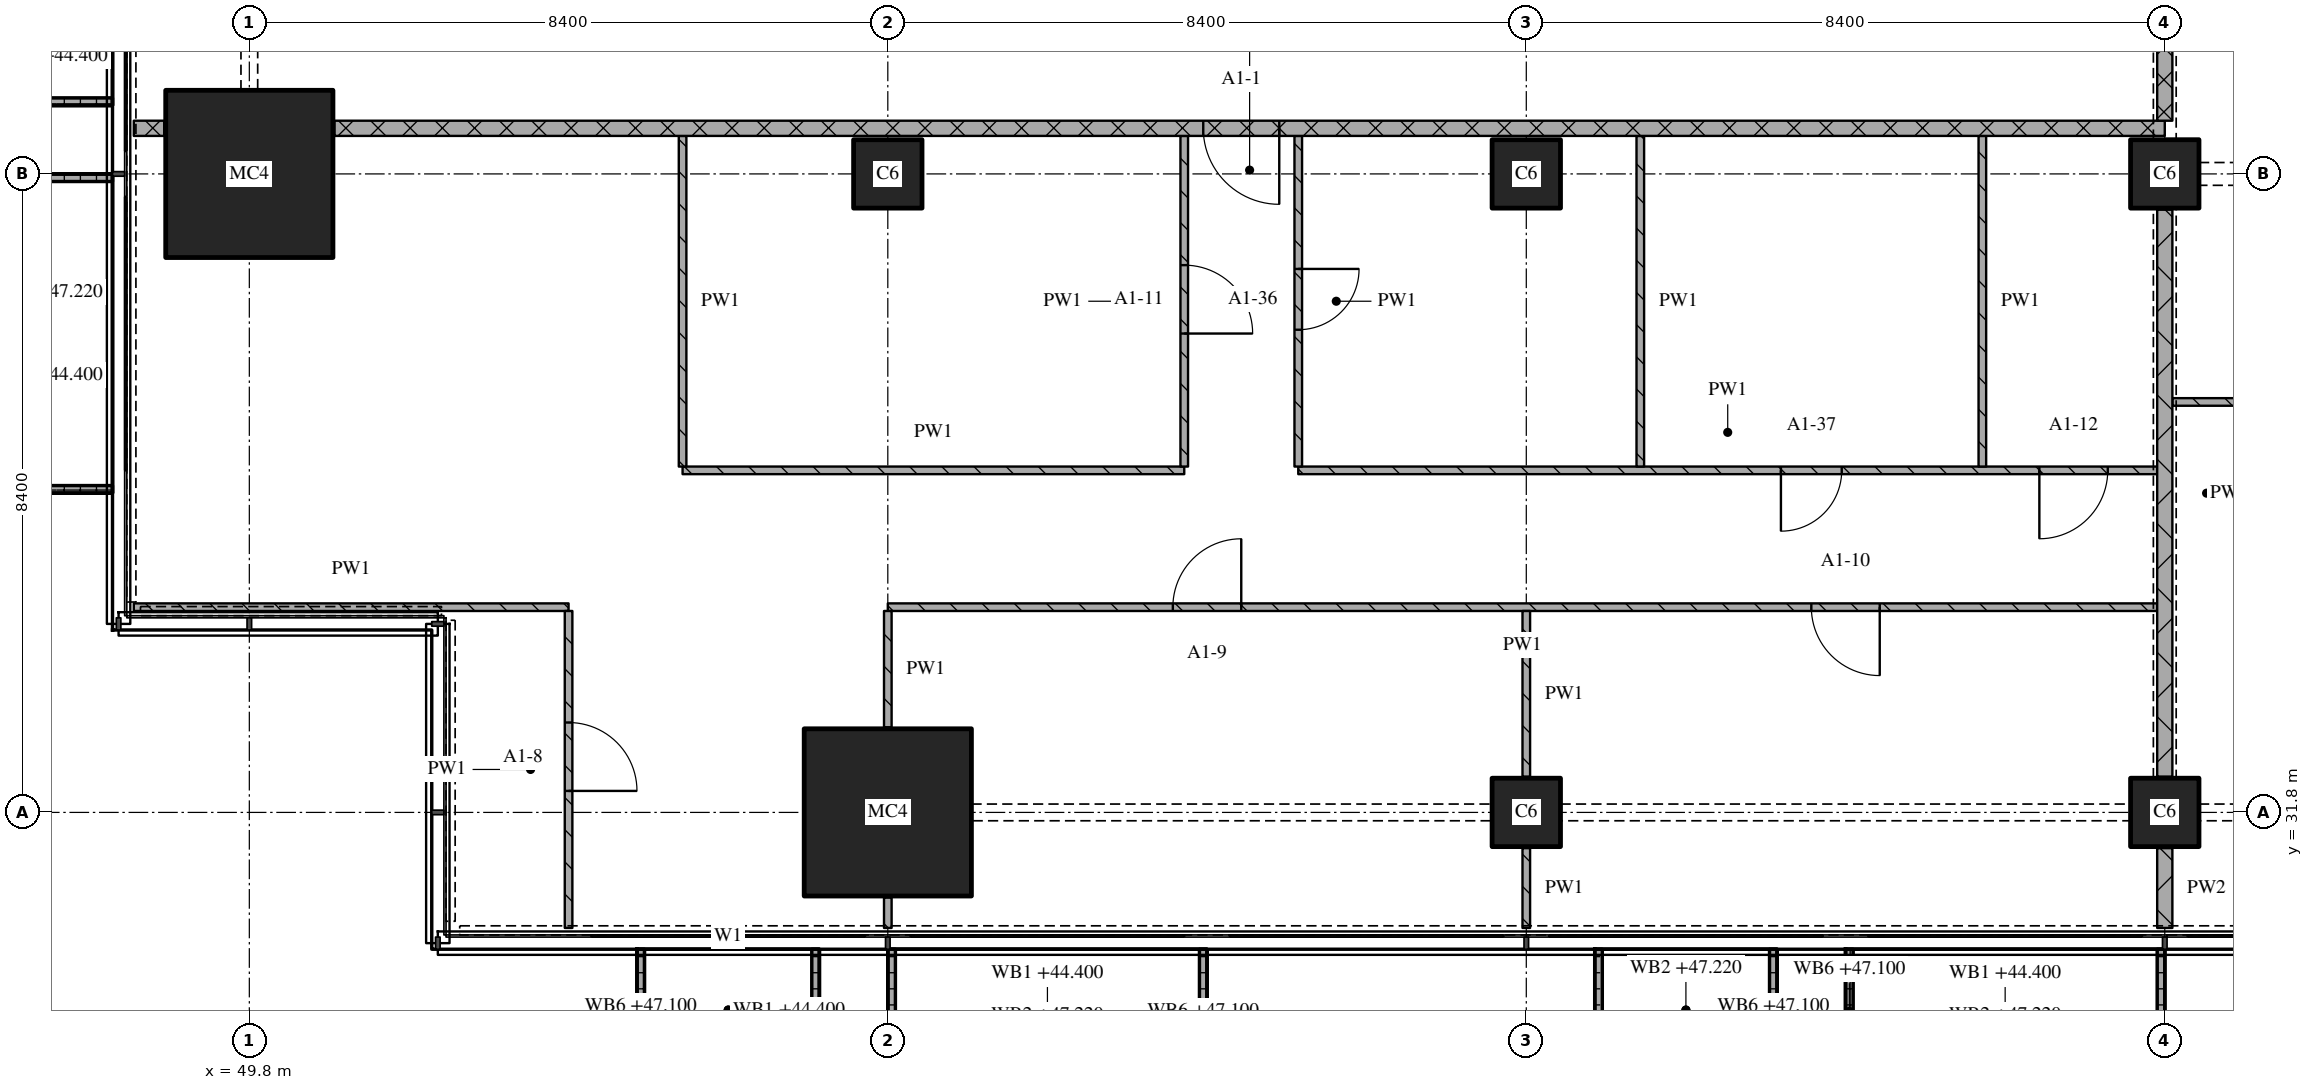
"""IFC4 building model, lengths in metres.
Left out: names, types, materials, properties, quantities, classifications, styles, units other than length and angle.
Written with IfcOpenShell. Run it as: python <this file> out.ifc"""

import sys

from ifc_helpers import new_model, si_unit, direction, frame, frame_2d, origin, origin_2d, place, context, subcontext, project, spatial, polyline, rectangle, outline, extrude, element, fill, save


model = new_model("IFC4")
c1 = context("Model", 3, precision=1e-05, world=origin(), true_north=direction((0.0, 1.0)))
c2 = subcontext(c1, "Body", "Model", "MODEL_VIEW")
j1 = project(units=[si_unit("LENGTHUNIT", "METRE"), si_unit("PLANEANGLEUNIT", "RADIAN")], contexts=[c1])
p1 = place(None, origin())
s1 = spatial("IfcSite", under=j1, at=p1, CompositionType="ELEMENT")
p2 = place(p1, origin())
s2 = spatial("IfcBuilding", under=s1, at=p2, CompositionType="ELEMENT")
p3 = place(p2, frame((0.0, 0.0, 44.4)))
s3 = spatial("IfcBuildingStorey", under=s2, at=p3, CompositionType="ELEMENT", Elevation=44.4)
for number, where, z_axis, x_axis in (
    (1, (49.8, 40.2, 0.0), (0.0, 0.0, 1.0), (1.0, 0.0, 0.0)),
    (2, (58.2, 31.8, 0.0), (0.0, 0.0, 1.0), (1.0, 0.0, 0.0)),
):
    element("IfcColumn", number, at=place(p3, frame(where, z_axis=z_axis, x_axis=x_axis)), inside=s3, PredefinedType="COLUMN", context=c2, shape_type="SweptSolid", body=[
        extrude(rectangle(XDim=2.2, YDim=2.2, at=origin_2d()), origin(), (0.0, 0.0, 1.0), 3.6),
    ])
for number, where, z_axis, x_axis in (
    (3, (58.2, 40.2, 0.0), (0.0, 0.0, 1.0), (1.0, 0.0, 0.0)),
    (4, (66.6, 31.8, 0.0), (0.0, 0.0, 1.0), (1.0, 0.0, 0.0)),
    (5, (66.6, 40.2, 0.0), (0.0, 0.0, 1.0), (1.0, 0.0, 0.0)),
    (6, (75.0, 31.8, 0.0), (0.0, 0.0, 1.0), (1.0, 0.0, 0.0)),
    (7, (75.0, 40.2, 0.0), (0.0, 0.0, 1.0), (1.0, 0.0, 0.0)),
):
    element("IfcColumn", number, at=place(p3, frame(where, z_axis=z_axis, x_axis=x_axis)), inside=s3, PredefinedType="COLUMN", context=c2, shape_type="SweptSolid", body=[
        extrude(rectangle(XDim=0.9, YDim=0.9, at=origin_2d()), origin(), (0.0, 0.0, 1.0), 3.6),
    ])
p4 = place(p3, origin())
e8 = element("IfcWall", 8, at=p4, inside=s3, PredefinedType="SOLIDWALL", context=c2, shape_type="SweptSolid", body=[
    extrude(outline(polyline([(54.9, 30.0), (55.0, 30.0), (55.0, 28.5), (57.2, 28.5), (57.2, 30.0), (57.3, 30.0), (57.3, 28.4), (54.9, 28.4), (54.9, 30.0)])), origin(), (0.0, 0.0, 1.0), 1.0),
])
p5 = place(p3, origin())
e9 = element("IfcWall", 9, at=p5, inside=s3, PredefinedType="SOLIDWALL", context=c2, shape_type="SweptSolid", body=[
    extrude(outline(polyline([(58.2, 30.0), (58.3, 30.0), (58.3, 28.367), (62.3, 28.367), (62.3, 30.0), (62.4, 30.0), (62.4, 28.267), (58.2, 28.267), (58.2, 30.0)])), origin(), (0.0, 0.0, 1.0), 1.0),
])
p6 = place(p3, origin())
e10 = element("IfcWall", 10, at=p6, inside=s3, PredefinedType="SOLIDWALL", context=c2, shape_type="SweptSolid", body=[
    extrude(outline(polyline([(67.5, 30.0), (67.6, 30.0), (67.6, 28.5), (69.8, 28.5), (69.8, 30.0), (69.9, 30.0), (69.9, 28.4), (67.5, 28.4), (67.5, 30.0)])), origin(), (0.0, 0.0, 1.0), 1.0),
])
p7 = place(p3, origin())
e11 = element("IfcWall", 11, at=p7, inside=s3, PredefinedType="SOLIDWALL", context=c2, shape_type="SweptSolid", body=[
    extrude(outline(polyline([(70.8, 30.0), (70.9, 30.0), (70.9, 28.367), (74.9, 28.367), (74.9, 30.0), (75.0, 30.0), (75.0, 28.267), (70.8, 28.267), (70.8, 30.0)])), origin(), (0.0, 0.0, 1.0), 1.0),
])
p8 = place(p3, origin())
e12 = element("IfcWall", 12, at=p8, inside=s3, PredefinedType="SOLIDWALL", context=c2, shape_type="SweptSolid", body=[
    extrude(outline(polyline([(48.0, 43.5), (48.0, 43.4), (46.5, 43.4), (46.5, 41.2), (48.0, 41.2), (48.0, 41.1), (46.4, 41.1), (46.4, 43.5), (48.0, 43.5)])), origin(), (0.0, 0.0, 1.0), 1.0),
])
p9 = place(p3, origin())
e13 = element("IfcWall", 13, at=p9, inside=s3, PredefinedType="SOLIDWALL", context=c2, shape_type="SweptSolid", body=[
    extrude(outline(polyline([(48.0, 40.2), (48.0, 40.1), (46.367, 40.1), (46.367, 36.1), (48.0, 36.1), (48.0, 36.0), (46.267, 36.0), (46.267, 40.2), (48.0, 40.2)])), origin(), (0.0, 0.0, 1.0), 1.0),
])
p10 = place(p3, frame((48.28, 34.5, 0.0), z_axis=(0.0, 0.0, 1.0), x_axis=(1.0, 0.0, 0.0)))
e14 = element("IfcWall", 14, at=p10, inside=s3, PredefinedType="PARTITIONING", context=c2, shape_type="SweptSolid", body=[
    extrude(rectangle(XDim=5.72, YDim=0.1, at=frame_2d((2.86, 0.0))), origin(), (0.0, 0.0, 1.0), 3.32),
])
p11 = place(p3, frame((74.9, 34.5, 0.0), z_axis=(0.0, 0.0, 1.0), x_axis=(-1.0, 0.0, 0.0)))
e15 = element("IfcWall", 15, at=p11, inside=s3, PredefinedType="PARTITIONING", context=c2, shape_type="SweptSolid", body=[
    extrude(rectangle(XDim=16.7, YDim=0.1, at=frame_2d((8.35, 0.0))), origin(), (0.0, 0.0, 1.0), 3.32),
])
p12 = place(p11, frame((3.65, 0.0, 0.0)))
e16 = element("IfcOpeningElement", 16, at=p12, cuts=e15, PredefinedType="OPENING", context=c2, shape_type="SweptSolid", body=[
    extrude(rectangle(XDim=0.9, YDim=2.1, at=frame_2d((0.45, 1.05))), frame((0.0, 0.06, 0.0), z_axis=(0.0, -1.0, 0.0), x_axis=(1.0, 0.0, 0.0)), (0.0, 0.0, 1.0), 0.12),
])
p13 = place(p11, frame((12.05, 0.0, 0.0)))
e17 = element("IfcOpeningElement", 17, at=p13, cuts=e15, PredefinedType="OPENING", context=c2, shape_type="SweptSolid", body=[
    extrude(rectangle(XDim=0.9, YDim=2.1, at=frame_2d((0.45, 1.05))), frame((0.0, 0.06, 0.0), z_axis=(0.0, -1.0, 0.0), x_axis=(1.0, 0.0, 0.0)), (0.0, 0.0, 1.0), 0.12),
])
p14 = place(p3, frame((55.5, 36.3, 0.0), z_axis=(0.0, 0.0, 1.0), x_axis=(1.0, 0.0, 0.0)))
e18 = element("IfcWall", 18, at=p14, inside=s3, PredefinedType="PARTITIONING", context=c2, shape_type="SweptSolid", body=[
    extrude(rectangle(XDim=6.6, YDim=0.1, at=frame_2d((3.3, 0.0))), origin(), (0.0, 0.0, 1.0), 3.32),
])
p15 = place(p3, frame((63.6, 36.3, 0.0), z_axis=(0.0, 0.0, 1.0), x_axis=(1.0, 0.0, 0.0)))
e19 = element("IfcWall", 19, at=p15, inside=s3, PredefinedType="PARTITIONING", context=c2, shape_type="SweptSolid", body=[
    extrude(rectangle(XDim=11.3, YDim=0.1, at=frame_2d((5.65, 0.0))), origin(), (0.0, 0.0, 1.0), 3.32),
])
p16 = place(p15, frame((6.35, 0.0, 0.0)))
e20 = element("IfcOpeningElement", 20, at=p16, cuts=e19, PredefinedType="OPENING", context=c2, shape_type="SweptSolid", body=[
    extrude(rectangle(XDim=0.8, YDim=2.1, at=frame_2d((0.4, 1.05))), frame((0.0, 0.06, 0.0), z_axis=(0.0, -1.0, 0.0), x_axis=(1.0, 0.0, 0.0)), (0.0, 0.0, 1.0), 0.12),
])
p17 = place(p15, frame((9.75, 0.0, 0.0)))
e21 = element("IfcOpeningElement", 21, at=p17, cuts=e19, PredefinedType="OPENING", context=c2, shape_type="SweptSolid", body=[
    extrude(rectangle(XDim=0.9, YDim=2.1, at=frame_2d((0.45, 1.05))), frame((0.0, 0.06, 0.0), z_axis=(0.0, -1.0, 0.0), x_axis=(1.0, 0.0, 0.0)), (0.0, 0.0, 1.0), 0.12),
])
p18 = place(p3, frame((87.6, 37.2, 0.0), z_axis=(0.0, 0.0, 1.0), x_axis=(-1.0, 0.0, 0.0)))
e22 = element("IfcWall", 22, at=p18, inside=s3, PredefinedType="PARTITIONING", context=c2, shape_type="SweptSolid", body=[
    extrude(rectangle(XDim=12.5, YDim=0.1, at=frame_2d((6.25, 0.0))), origin(), (0.0, 0.0, 1.0), 3.32),
])
p19 = place(p18, frame((5.85, 0.0, 0.0)))
e23 = element("IfcOpeningElement", 23, at=p19, cuts=e22, PredefinedType="OPENING", context=c2, shape_type="SweptSolid", body=[
    extrude(rectangle(XDim=0.9, YDim=2.1, at=frame_2d((0.45, 1.05))), frame((0.0, 0.06, 0.0), z_axis=(0.0, -1.0, 0.0), x_axis=(1.0, 0.0, 0.0)), (0.0, 0.0, 1.0), 0.12),
])
p20 = place(p18, frame((10.05, 0.0, 0.0)))
e24 = element("IfcOpeningElement", 24, at=p20, cuts=e22, PredefinedType="OPENING", context=c2, shape_type="SweptSolid", body=[
    extrude(rectangle(XDim=0.9, YDim=2.1, at=frame_2d((0.45, 1.05))), frame((0.0, 0.06, 0.0), z_axis=(0.0, -1.0, 0.0), x_axis=(1.0, 0.0, 0.0)), (0.0, 0.0, 1.0), 0.12),
])
p21 = place(p3, frame((48.28, 40.8, 0.0), z_axis=(0.0, 0.0, 1.0), x_axis=(1.0, 0.0, 0.0)))
e25 = element("IfcWall", 25, at=p21, inside=s3, PredefinedType="PARTITIONING", context=c2, shape_type="SweptSolid", body=[
    extrude(rectangle(XDim=0.4, YDim=0.2, at=frame_2d((0.2, 0.0))), origin(), (0.0, 0.0, 1.0), 3.32),
])
p22 = place(p3, frame((75.0, 40.8, 0.0), z_axis=(0.0, 0.0, 1.0), x_axis=(-1.0, 0.0, 0.0)))
e26 = element("IfcWall", 26, at=p22, inside=s3, PredefinedType="PARTITIONING", context=c2, shape_type="SweptSolid", body=[
    extrude(rectangle(XDim=24.08, YDim=0.2, at=frame_2d((12.04, 0.0))), origin(), (0.0, 0.0, 1.0), 3.32),
])
p23 = place(p22, frame((11.65, 0.0, 0.0)))
e27 = element("IfcOpeningElement", 27, at=p23, cuts=e26, PredefinedType="OPENING", context=c2, shape_type="SweptSolid", body=[
    extrude(rectangle(XDim=1.0, YDim=2.1, at=frame_2d((0.5, 1.05))), frame((0.0, 0.11, 0.0), z_axis=(0.0, -1.0, 0.0), x_axis=(1.0, 0.0, 0.0)), (0.0, 0.0, 1.0), 0.22),
])
p24 = place(p3, frame((54.0, 30.28, 0.0), z_axis=(0.0, 0.0, 1.0), x_axis=(0.0, 1.0, 0.0)))
e28 = element("IfcWall", 28, at=p24, inside=s3, PredefinedType="PARTITIONING", context=c2, shape_type="SweptSolid", body=[
    extrude(rectangle(XDim=4.17, YDim=0.1, at=frame_2d((2.085, 0.0))), origin(), (0.0, 0.0, 1.0), 3.32),
])
p25 = place(p24, frame((1.803, 0.0, 0.0)))
e29 = element("IfcOpeningElement", 29, at=p25, cuts=e28, PredefinedType="OPENING", context=c2, shape_type="SweptSolid", body=[
    extrude(rectangle(XDim=0.9, YDim=2.1, at=frame_2d((0.45, 1.05))), frame((0.0, 0.06, 0.0), z_axis=(0.0, -1.0, 0.0), x_axis=(1.0, 0.0, 0.0)), (0.0, 0.0, 1.0), 0.12),
])
p26 = place(p3, frame((55.5, 40.7, 0.0), z_axis=(0.0, 0.0, 1.0), x_axis=(0.0, -1.0, 0.0)))
e30 = element("IfcWall", 30, at=p26, inside=s3, PredefinedType="PARTITIONING", context=c2, shape_type="SweptSolid", body=[
    extrude(rectangle(XDim=4.35, YDim=0.1, at=frame_2d((2.175, 0.0))), origin(), (0.0, 0.0, 1.0), 3.32),
])
p27 = place(p3, frame((58.2, 30.68, 0.0), z_axis=(0.0, 0.0, 1.0), x_axis=(0.0, -1.0, 0.0)))
e31 = element("IfcWall", 31, at=p27, inside=s3, PredefinedType="PARTITIONING", context=c2, shape_type="SweptSolid", body=[
    extrude(rectangle(XDim=0.4, YDim=0.1, at=frame_2d((0.2, 0.0))), origin(), (0.0, 0.0, 1.0), 3.32),
])
p28 = place(p3, frame((58.2, 34.45, 0.0), z_axis=(0.0, 0.0, 1.0), x_axis=(0.0, -1.0, 0.0)))
e32 = element("IfcWall", 32, at=p28, inside=s3, PredefinedType="PARTITIONING", context=c2, shape_type="SweptSolid", body=[
    extrude(rectangle(XDim=1.53, YDim=0.1, at=frame_2d((0.765, 0.0))), origin(), (0.0, 0.0, 1.0), 3.32),
])
p29 = place(p3, frame((62.1, 36.35, 0.0), z_axis=(0.0, 0.0, 1.0), x_axis=(0.0, 1.0, 0.0)))
e33 = element("IfcWall", 33, at=p29, inside=s3, PredefinedType="PARTITIONING", context=c2, shape_type="SweptSolid", body=[
    extrude(rectangle(XDim=4.35, YDim=0.1, at=frame_2d((2.175, 0.0))), origin(), (0.0, 0.0, 1.0), 3.32),
])
p30 = place(p29, frame((1.75, 0.0, 0.0)))
e34 = element("IfcOpeningElement", 34, at=p30, cuts=e33, PredefinedType="OPENING", context=c2, shape_type="SweptSolid", body=[
    extrude(rectangle(XDim=0.9, YDim=2.1, at=frame_2d((0.45, 1.05))), frame((0.0, 0.06, 0.0), z_axis=(0.0, -1.0, 0.0), x_axis=(1.0, 0.0, 0.0)), (0.0, 0.0, 1.0), 0.12),
])
p31 = place(p3, frame((63.6, 40.7, 0.0), z_axis=(0.0, 0.0, 1.0), x_axis=(0.0, -1.0, 0.0)))
e35 = element("IfcWall", 35, at=p31, inside=s3, PredefinedType="PARTITIONING", context=c2, shape_type="SweptSolid", body=[
    extrude(rectangle(XDim=4.35, YDim=0.1, at=frame_2d((2.175, 0.0))), origin(), (0.0, 0.0, 1.0), 3.32),
])
p32 = place(p31, frame((1.75, 0.0, 0.0)))
e36 = element("IfcOpeningElement", 36, at=p32, cuts=e35, PredefinedType="OPENING", context=c2, shape_type="SweptSolid", body=[
    extrude(rectangle(XDim=0.8, YDim=2.1, at=frame_2d((0.4, 1.05))), frame((0.0, 0.06, 0.0), z_axis=(0.0, -1.0, 0.0), x_axis=(1.0, 0.0, 0.0)), (0.0, 0.0, 1.0), 0.12),
])
p33 = place(p3, frame((66.6, 31.33, 0.0), z_axis=(0.0, 0.0, 1.0), x_axis=(0.0, -1.0, 0.0)))
e37 = element("IfcWall", 37, at=p33, inside=s3, PredefinedType="PARTITIONING", context=c2, shape_type="SweptSolid", body=[
    extrude(rectangle(XDim=1.05, YDim=0.1, at=frame_2d((0.525, 0.0))), origin(), (0.0, 0.0, 1.0), 3.32),
])
p34 = place(p3, frame((66.6, 34.45, 0.0), z_axis=(0.0, 0.0, 1.0), x_axis=(0.0, -1.0, 0.0)))
e38 = element("IfcWall", 38, at=p34, inside=s3, PredefinedType="PARTITIONING", context=c2, shape_type="SweptSolid", body=[
    extrude(rectangle(XDim=2.18, YDim=0.1, at=frame_2d((1.09, 0.0))), origin(), (0.0, 0.0, 1.0), 3.32),
])
for number, where, z_axis, x_axis in (
    (39, (68.1, 40.7, 0.0), (0.0, 0.0, 1.0), (0.0, -1.0, 0.0)),
    (40, (72.6, 40.7, 0.0), (0.0, 0.0, 1.0), (0.0, -1.0, 0.0)),
):
    element("IfcWall", number, at=place(p3, frame(where, z_axis=z_axis, x_axis=x_axis)), inside=s3, PredefinedType="PARTITIONING", context=c2, shape_type="SweptSolid", body=[
        extrude(rectangle(XDim=4.35, YDim=0.1, at=frame_2d((2.175, 0.0))), origin(), (0.0, 0.0, 1.0), 3.32),
    ])
p35 = place(p3, frame((75.0, 43.1, 0.0), z_axis=(0.0, 0.0, 1.0), x_axis=(0.0, -1.0, 0.0)))
e41 = element("IfcWall", 41, at=p35, inside=s3, PredefinedType="PARTITIONING", context=c2, shape_type="SweptSolid", body=[
    extrude(rectangle(XDim=2.2, YDim=0.2, at=frame_2d((1.1, 0.0))), origin(), (0.0, 0.0, 1.0), 2.43),
])
p36 = place(p3, frame((75.0, 31.33, 0.0), z_axis=(0.0, 0.0, 1.0), x_axis=(0.0, -1.0, 0.0)))
e42 = element("IfcWall", 42, at=p36, inside=s3, PredefinedType="PARTITIONING", context=c2, shape_type="SweptSolid", body=[
    extrude(rectangle(XDim=1.05, YDim=0.2, at=frame_2d((0.525, 0.0))), origin(), (0.0, 0.0, 1.0), 3.32),
])
p37 = place(p3, frame((75.0, 39.73, 0.0), z_axis=(0.0, 0.0, 1.0), x_axis=(0.0, -1.0, 0.0)))
e43 = element("IfcWall", 43, at=p37, inside=s3, PredefinedType="PARTITIONING", context=c2, shape_type="SweptSolid", body=[
    extrude(rectangle(XDim=7.46, YDim=0.2, at=frame_2d((3.73, 0.0))), origin(), (0.0, 0.0, 1.0), 2.83),
])
p38 = place(p12, origin())
e44 = element("IfcDoor", 44, at=p38, inside=s3, OperationType="SINGLE_SWING_LEFT", PredefinedType="DOOR", context=c2, shape_type="SweptSolid", body=[
    extrude(rectangle(XDim=0.9, YDim=2.1, at=frame_2d((0.45, 1.05))), frame((0.0, 0.025, 0.0), z_axis=(0.0, -1.0, 0.0), x_axis=(1.0, 0.0, 0.0)), (0.0, 0.0, 1.0), 0.05),
])
fill(e16, e44)
p39 = place(p13, origin())
e45 = element("IfcDoor", 45, at=p39, inside=s3, OperationType="SINGLE_SWING_RIGHT", PredefinedType="DOOR", context=c2, shape_type="SweptSolid", body=[
    extrude(rectangle(XDim=0.9, YDim=2.1, at=frame_2d((0.45, 1.05))), frame((0.0, 0.025, 0.0), z_axis=(0.0, -1.0, 0.0), x_axis=(1.0, 0.0, 0.0)), (0.0, 0.0, 1.0), 0.05),
])
fill(e17, e45)
p40 = place(p16, origin())
e46 = element("IfcDoor", 46, at=p40, inside=s3, OperationType="SINGLE_SWING_RIGHT", PredefinedType="DOOR", context=c2, shape_type="SweptSolid", body=[
    extrude(rectangle(XDim=0.8, YDim=2.1, at=frame_2d((0.4, 1.05))), frame((0.0, 0.025, 0.0), z_axis=(0.0, -1.0, 0.0), x_axis=(1.0, 0.0, 0.0)), (0.0, 0.0, 1.0), 0.05),
])
fill(e20, e46)
p41 = place(p17, origin())
e47 = element("IfcDoor", 47, at=p41, inside=s3, OperationType="SINGLE_SWING_RIGHT", PredefinedType="DOOR", context=c2, shape_type="SweptSolid", body=[
    extrude(rectangle(XDim=0.9, YDim=2.1, at=frame_2d((0.45, 1.05))), frame((0.0, 0.025, 0.0), z_axis=(0.0, -1.0, 0.0), x_axis=(1.0, 0.0, 0.0)), (0.0, 0.0, 1.0), 0.05),
])
fill(e21, e47)
p42 = place(p23, origin())
e48 = element("IfcDoor", 48, at=p42, inside=s3, OperationType="SINGLE_SWING_LEFT", PredefinedType="DOOR", context=c2, shape_type="SweptSolid", body=[
    extrude(rectangle(XDim=1.0, YDim=2.1, at=frame_2d((0.5, 1.05))), frame((0.0, 0.025, 0.0), z_axis=(0.0, -1.0, 0.0), x_axis=(1.0, 0.0, 0.0)), (0.0, 0.0, 1.0), 0.05),
])
fill(e27, e48)
p43 = place(p25, origin())
e49 = element("IfcDoor", 49, at=p43, inside=s3, OperationType="SINGLE_SWING_RIGHT", PredefinedType="DOOR", context=c2, shape_type="SweptSolid", body=[
    extrude(rectangle(XDim=0.9, YDim=2.1, at=frame_2d((0.45, 1.05))), frame((0.0, 0.025, 0.0), z_axis=(0.0, -1.0, 0.0), x_axis=(1.0, 0.0, 0.0)), (0.0, 0.0, 1.0), 0.05),
])
fill(e29, e49)
p44 = place(p30, origin())
e50 = element("IfcDoor", 50, at=p44, inside=s3, OperationType="SINGLE_SWING_RIGHT", PredefinedType="DOOR", context=c2, shape_type="SweptSolid", body=[
    extrude(rectangle(XDim=0.9, YDim=2.1, at=frame_2d((0.45, 1.05))), frame((0.0, 0.025, 0.0), z_axis=(0.0, -1.0, 0.0), x_axis=(1.0, 0.0, 0.0)), (0.0, 0.0, 1.0), 0.05),
])
fill(e34, e50)
p45 = place(p32, origin())
e51 = element("IfcDoor", 51, at=p45, inside=s3, OperationType="SINGLE_SWING_LEFT", PredefinedType="DOOR", context=c2, shape_type="SweptSolid", body=[
    extrude(rectangle(XDim=0.8, YDim=2.1, at=frame_2d((0.4, 1.05))), frame((0.0, 0.025, 0.0), z_axis=(0.0, -1.0, 0.0), x_axis=(1.0, 0.0, 0.0)), (0.0, 0.0, 1.0), 0.05),
])
fill(e36, e51)
save(model, sys.argv[1])
